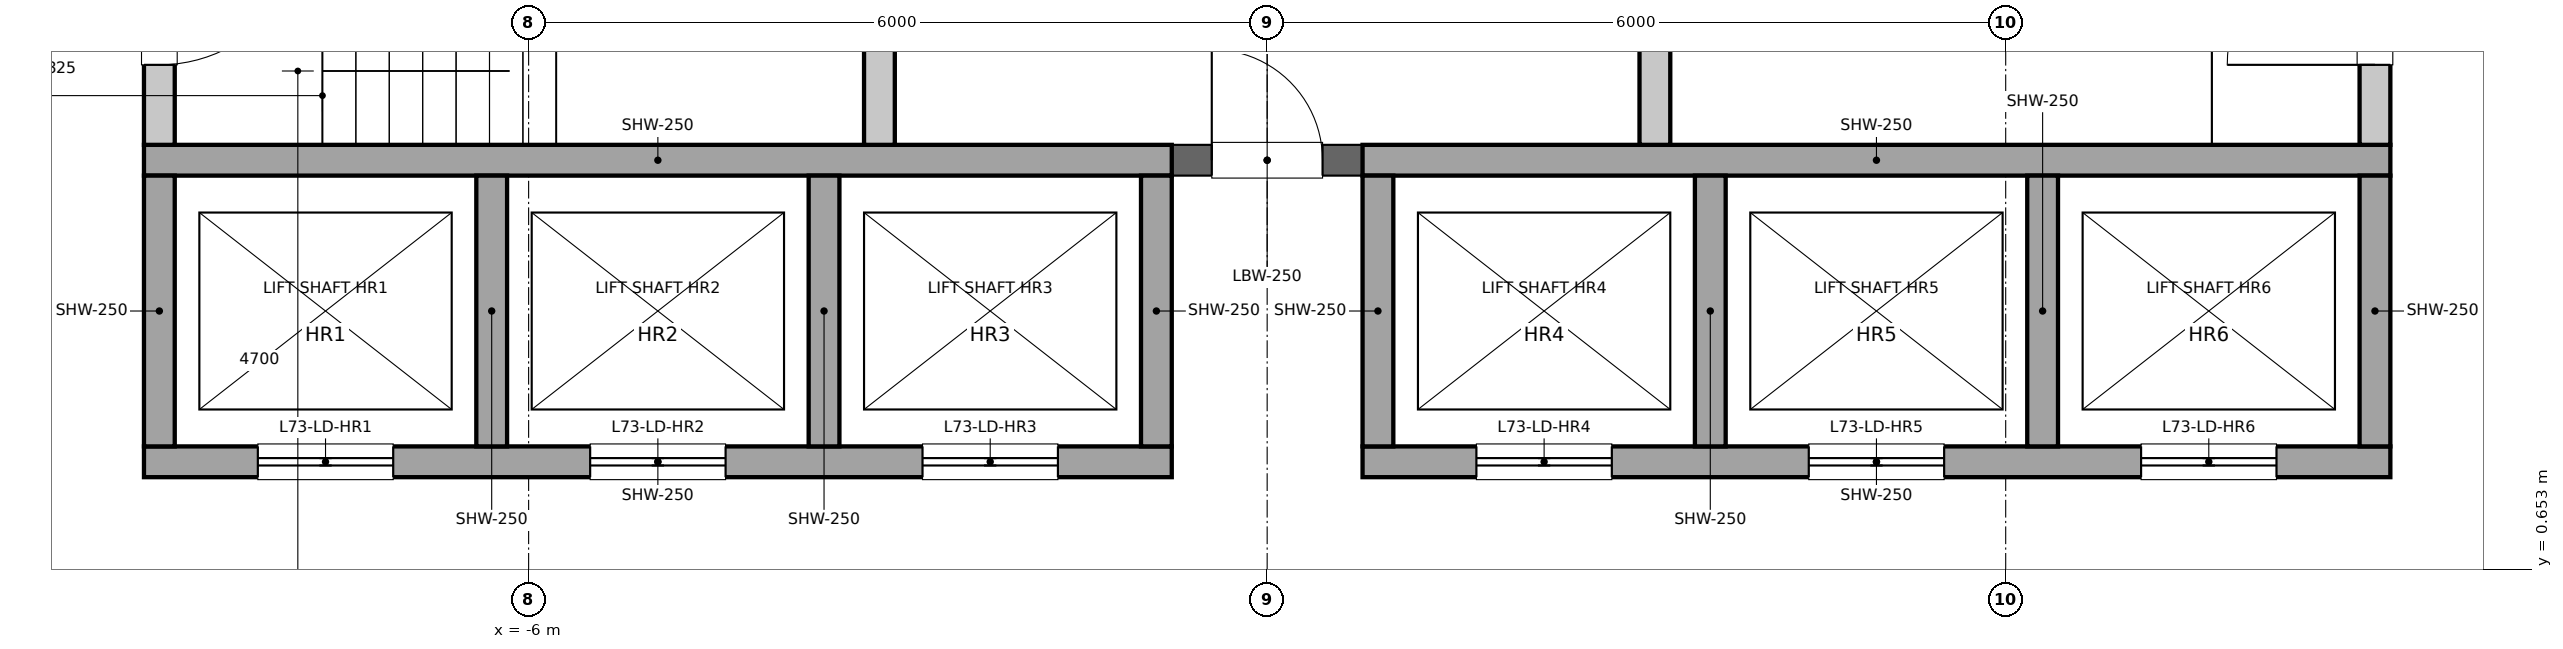
"""IFC4 building model, lengths in metres.
Left out: names, types, materials, properties, quantities, classifications, styles, units other than length and angle.
Written with IfcOpenShell. Run it as: python <this file> out.ifc"""

import sys

from ifc_helpers import new_model, si_unit, direction, frame, frame_2d, origin, place, context, subcontext, project, spatial, rectangle, extrude, element, fill, save


model = new_model("IFC4")
c1 = context("Model", 3, precision=1e-05, world=origin(), true_north=direction((0.0, 1.0)))
c2 = subcontext(c1, "Body", "Model", "MODEL_VIEW")
j1 = project(units=[si_unit("LENGTHUNIT", "METRE"), si_unit("PLANEANGLEUNIT", "RADIAN")], contexts=[c1])
p1 = place(None, origin())
s1 = spatial("IfcSite", under=j1, at=p1, CompositionType="ELEMENT")
p2 = place(p1, origin())
s2 = spatial("IfcBuilding", under=s1, at=p2, CompositionType="ELEMENT")
p3 = place(p2, frame((0.0, 0.0, 329.8)))
s3 = spatial("IfcBuildingStorey", under=s2, at=p3, CompositionType="ELEMENT", Elevation=329.8)
p4 = place(p3, frame((-9.0, 4.1, 0.0), z_axis=(0.0, 0.0, 1.0), x_axis=(0.0, 1.0, 0.0)))
e1 = element("IfcWall", 1, at=p4, inside=s3, PredefinedType="SOLIDWALL", context=c2, shape_type="SweptSolid", body=[
    extrude(rectangle(XDim=2.5, YDim=0.25, at=frame_2d((1.25, 0.0))), origin(), (0.0, 0.0, 1.0), 5.8),
])
p5 = place(p4, frame((0.65, 0.0, 0.0)))
e2 = element("IfcOpeningElement", 2, at=p5, cuts=e1, PredefinedType="OPENING", context=c2, shape_type="SweptSolid", body=[
    extrude(rectangle(XDim=1.2, YDim=2.1, at=frame_2d((0.6, 1.05))), frame((0.0, 0.125, 0.0), z_axis=(0.0, -1.0, 0.0), x_axis=(1.0, 0.0, 0.0)), (0.0, 0.0, 1.0), 0.25),
])
p6 = place(p3, frame((9.0, 4.1, 0.0), z_axis=(0.0, 0.0, 1.0), x_axis=(0.0, 1.0, 0.0)))
e3 = element("IfcWall", 3, at=p6, inside=s3, PredefinedType="SOLIDWALL", context=c2, shape_type="SweptSolid", body=[
    extrude(rectangle(XDim=2.5, YDim=0.25, at=frame_2d((1.25, 0.0))), origin(), (0.0, 0.0, 1.0), 5.8),
])
p7 = place(p6, frame((0.65, 0.0, 0.0)))
e4 = element("IfcOpeningElement", 4, at=p7, cuts=e3, PredefinedType="OPENING", context=c2, shape_type="SweptSolid", body=[
    extrude(rectangle(XDim=1.2, YDim=2.1, at=frame_2d((0.6, 1.05))), frame((0.0, 0.125, 0.0), z_axis=(0.0, -1.0, 0.0), x_axis=(1.0, 0.0, 0.0)), (0.0, 0.0, 1.0), 0.25),
])
for number, where, z_axis, x_axis in (
    (5, (-3.15, 4.1, 0.0), (0.0, 0.0, 1.0), (0.0, 1.0, 0.0)),
    (6, (3.15, 4.1, 0.0), (0.0, 0.0, 1.0), (0.0, 1.0, 0.0)),
):
    element("IfcWall", number, at=place(p3, frame(where, z_axis=z_axis, x_axis=x_axis)), inside=s3, PredefinedType="SOLIDWALL", context=c2, shape_type="SweptSolid", body=[
        extrude(rectangle(XDim=2.5, YDim=0.25, at=frame_2d((1.25, 0.0))), origin(), (0.0, 0.0, 1.0), 5.8),
    ])
p8 = place(p3, frame((-0.775, 3.975, 0.0), z_axis=(0.0, 0.0, 1.0), x_axis=(1.0, 0.0, 0.0)))
e7 = element("IfcWall", 7, at=p8, inside=s3, PredefinedType="PARTITIONING", context=c2, shape_type="SweptSolid", body=[
    extrude(rectangle(XDim=1.55, YDim=0.25, at=frame_2d((0.775, 0.0))), origin(), (0.0, 0.0, 1.0), 5.8),
])
p9 = place(p8, frame((0.325, 0.0, 0.0)))
e8 = element("IfcOpeningElement", 8, at=p9, cuts=e7, PredefinedType="OPENING", context=c2, shape_type="SweptSolid", body=[
    extrude(rectangle(XDim=0.9, YDim=2.1, at=frame_2d((0.45, 1.05))), frame((0.0, 0.125, 0.0), z_axis=(0.0, -1.0, 0.0), x_axis=(1.0, 0.0, 0.0)), (0.0, 0.0, 1.0), 0.25),
])
p10 = place(p3, frame((-9.125, 1.525, 0.0), z_axis=(0.0, 0.0, 1.0), x_axis=(1.0, 0.0, 0.0)))
e9 = element("IfcWall", 9, at=p10, inside=s3, PredefinedType="SOLIDWALL", context=c2, shape_type="SweptSolid", body=[
    extrude(rectangle(XDim=8.35, YDim=0.25, at=frame_2d((4.175, 0.0))), origin(), (0.0, 0.0, 1.0), 5.8),
])
p11 = place(p10, frame((0.925, 0.0, 0.0)))
e10 = element("IfcOpeningElement", 10, at=p11, cuts=e9, PredefinedType="OPENING", context=c2, shape_type="SweptSolid", body=[
    extrude(rectangle(XDim=1.1, YDim=2.1, at=frame_2d((0.55, 1.05))), frame((0.0, 0.125, 0.0), z_axis=(0.0, -1.0, 0.0), x_axis=(1.0, 0.0, 0.0)), (0.0, 0.0, 1.0), 0.25),
])
p12 = place(p10, frame((3.625, 0.0, 0.0)))
e11 = element("IfcOpeningElement", 11, at=p12, cuts=e9, PredefinedType="OPENING", context=c2, shape_type="SweptSolid", body=[
    extrude(rectangle(XDim=1.1, YDim=2.1, at=frame_2d((0.55, 1.05))), frame((0.0, 0.125, 0.0), z_axis=(0.0, -1.0, 0.0), x_axis=(1.0, 0.0, 0.0)), (0.0, 0.0, 1.0), 0.25),
])
p13 = place(p10, frame((6.325, 0.0, 0.0)))
e12 = element("IfcOpeningElement", 12, at=p13, cuts=e9, PredefinedType="OPENING", context=c2, shape_type="SweptSolid", body=[
    extrude(rectangle(XDim=1.1, YDim=2.1, at=frame_2d((0.55, 1.05))), frame((0.0, 0.125, 0.0), z_axis=(0.0, -1.0, 0.0), x_axis=(1.0, 0.0, 0.0)), (0.0, 0.0, 1.0), 0.25),
])
p14 = place(p3, frame((0.775, 1.525, 0.0), z_axis=(0.0, 0.0, 1.0), x_axis=(1.0, 0.0, 0.0)))
e13 = element("IfcWall", 13, at=p14, inside=s3, PredefinedType="SOLIDWALL", context=c2, shape_type="SweptSolid", body=[
    extrude(rectangle(XDim=8.35, YDim=0.25, at=frame_2d((4.175, 0.0))), origin(), (0.0, 0.0, 1.0), 5.8),
])
p15 = place(p14, frame((0.925, 0.0, 0.0)))
e14 = element("IfcOpeningElement", 14, at=p15, cuts=e13, PredefinedType="OPENING", context=c2, shape_type="SweptSolid", body=[
    extrude(rectangle(XDim=1.1, YDim=2.1, at=frame_2d((0.55, 1.05))), frame((0.0, 0.125, 0.0), z_axis=(0.0, -1.0, 0.0), x_axis=(1.0, 0.0, 0.0)), (0.0, 0.0, 1.0), 0.25),
])
p16 = place(p14, frame((3.625, 0.0, 0.0)))
e15 = element("IfcOpeningElement", 15, at=p16, cuts=e13, PredefinedType="OPENING", context=c2, shape_type="SweptSolid", body=[
    extrude(rectangle(XDim=1.1, YDim=2.1, at=frame_2d((0.55, 1.05))), frame((0.0, 0.125, 0.0), z_axis=(0.0, -1.0, 0.0), x_axis=(1.0, 0.0, 0.0)), (0.0, 0.0, 1.0), 0.25),
])
p17 = place(p14, frame((6.325, 0.0, 0.0)))
e16 = element("IfcOpeningElement", 16, at=p17, cuts=e13, PredefinedType="OPENING", context=c2, shape_type="SweptSolid", body=[
    extrude(rectangle(XDim=1.1, YDim=2.1, at=frame_2d((0.55, 1.05))), frame((0.0, 0.125, 0.0), z_axis=(0.0, -1.0, 0.0), x_axis=(1.0, 0.0, 0.0)), (0.0, 0.0, 1.0), 0.25),
])
for number, where, z_axis, x_axis in (
    (17, (-9.125, 3.975, 0.0), (0.0, 0.0, 1.0), (1.0, 0.0, 0.0)),
    (18, (0.775, 3.975, 0.0), (0.0, 0.0, 1.0), (1.0, 0.0, 0.0)),
):
    element("IfcWall", number, at=place(p3, frame(where, z_axis=z_axis, x_axis=x_axis)), inside=s3, PredefinedType="SOLIDWALL", context=c2, shape_type="SweptSolid", body=[
        extrude(rectangle(XDim=8.35, YDim=0.25, at=frame_2d((4.175, 0.0))), origin(), (0.0, 0.0, 1.0), 5.8),
    ])
for number, where, z_axis, x_axis in (
    (19, (-9.0, 1.65, 0.0), (0.0, 0.0, 1.0), (0.0, 1.0, 0.0)),
    (20, (9.0, 1.65, 0.0), (0.0, 0.0, 1.0), (0.0, 1.0, 0.0)),
    (21, (-6.3, 1.65, 0.0), (0.0, 0.0, 1.0), (0.0, 1.0, 0.0)),
    (22, (6.3, 1.65, 0.0), (0.0, 0.0, 1.0), (0.0, 1.0, 0.0)),
    (23, (-3.6, 1.65, 0.0), (0.0, 0.0, 1.0), (0.0, 1.0, 0.0)),
    (24, (3.6, 1.65, 0.0), (0.0, 0.0, 1.0), (0.0, 1.0, 0.0)),
    (25, (-0.9, 1.65, 0.0), (0.0, 0.0, 1.0), (0.0, 1.0, 0.0)),
    (26, (0.9, 1.65, 0.0), (0.0, 0.0, 1.0), (0.0, 1.0, 0.0)),
):
    element("IfcWall", number, at=place(p3, frame(where, z_axis=z_axis, x_axis=x_axis)), inside=s3, PredefinedType="SOLIDWALL", context=c2, shape_type="SweptSolid", body=[
        extrude(rectangle(XDim=2.2, YDim=0.25, at=frame_2d((1.1, 0.0))), origin(), (0.0, 0.0, 1.0), 5.8),
    ])
p18 = place(p11, origin())
e27 = element("IfcDoor", 27, at=p18, inside=s3, OperationType="DOUBLE_DOOR_SLIDING", PredefinedType="DOOR", context=c2, shape_type="SweptSolid", body=[
    extrude(rectangle(XDim=1.1, YDim=2.1, at=frame_2d((0.55, 1.05))), frame((0.0, 0.025, 0.0), z_axis=(0.0, -1.0, 0.0), x_axis=(1.0, 0.0, 0.0)), (0.0, 0.0, 1.0), 0.05),
])
fill(e10, e27)
p19 = place(p12, origin())
e28 = element("IfcDoor", 28, at=p19, inside=s3, OperationType="DOUBLE_DOOR_SLIDING", PredefinedType="DOOR", context=c2, shape_type="SweptSolid", body=[
    extrude(rectangle(XDim=1.1, YDim=2.1, at=frame_2d((0.55, 1.05))), frame((0.0, 0.025, 0.0), z_axis=(0.0, -1.0, 0.0), x_axis=(1.0, 0.0, 0.0)), (0.0, 0.0, 1.0), 0.05),
])
fill(e11, e28)
p20 = place(p13, origin())
e29 = element("IfcDoor", 29, at=p20, inside=s3, OperationType="DOUBLE_DOOR_SLIDING", PredefinedType="DOOR", context=c2, shape_type="SweptSolid", body=[
    extrude(rectangle(XDim=1.1, YDim=2.1, at=frame_2d((0.55, 1.05))), frame((0.0, 0.025, 0.0), z_axis=(0.0, -1.0, 0.0), x_axis=(1.0, 0.0, 0.0)), (0.0, 0.0, 1.0), 0.05),
])
fill(e12, e29)
p21 = place(p15, origin())
e30 = element("IfcDoor", 30, at=p21, inside=s3, OperationType="DOUBLE_DOOR_SLIDING", PredefinedType="DOOR", context=c2, shape_type="SweptSolid", body=[
    extrude(rectangle(XDim=1.1, YDim=2.1, at=frame_2d((0.55, 1.05))), frame((0.0, 0.025, 0.0), z_axis=(0.0, -1.0, 0.0), x_axis=(1.0, 0.0, 0.0)), (0.0, 0.0, 1.0), 0.05),
])
fill(e14, e30)
p22 = place(p16, origin())
e31 = element("IfcDoor", 31, at=p22, inside=s3, OperationType="DOUBLE_DOOR_SLIDING", PredefinedType="DOOR", context=c2, shape_type="SweptSolid", body=[
    extrude(rectangle(XDim=1.1, YDim=2.1, at=frame_2d((0.55, 1.05))), frame((0.0, 0.025, 0.0), z_axis=(0.0, -1.0, 0.0), x_axis=(1.0, 0.0, 0.0)), (0.0, 0.0, 1.0), 0.05),
])
fill(e15, e31)
p23 = place(p17, origin())
e32 = element("IfcDoor", 32, at=p23, inside=s3, OperationType="DOUBLE_DOOR_SLIDING", PredefinedType="DOOR", context=c2, shape_type="SweptSolid", body=[
    extrude(rectangle(XDim=1.1, YDim=2.1, at=frame_2d((0.55, 1.05))), frame((0.0, 0.025, 0.0), z_axis=(0.0, -1.0, 0.0), x_axis=(1.0, 0.0, 0.0)), (0.0, 0.0, 1.0), 0.05),
])
fill(e16, e32)
p24 = place(p5, origin())
e33 = element("IfcDoor", 33, at=p24, inside=s3, OperationType="SINGLE_SWING_RIGHT", PredefinedType="DOOR", context=c2, shape_type="SweptSolid", body=[
    extrude(rectangle(XDim=1.2, YDim=2.1, at=frame_2d((0.6, 1.05))), frame((0.0, 0.025, 0.0), z_axis=(0.0, -1.0, 0.0), x_axis=(1.0, 0.0, 0.0)), (0.0, 0.0, 1.0), 0.05),
])
fill(e2, e33)
p25 = place(p7, origin())
e34 = element("IfcDoor", 34, at=p25, inside=s3, OperationType="SINGLE_SWING_LEFT", PredefinedType="DOOR", context=c2, shape_type="SweptSolid", body=[
    extrude(rectangle(XDim=1.2, YDim=2.1, at=frame_2d((0.6, 1.05))), frame((0.0, 0.025, 0.0), z_axis=(0.0, -1.0, 0.0), x_axis=(1.0, 0.0, 0.0)), (0.0, 0.0, 1.0), 0.05),
])
fill(e4, e34)
p26 = place(p9, origin())
e35 = element("IfcDoor", 35, at=p26, inside=s3, OperationType="SINGLE_SWING_LEFT", PredefinedType="DOOR", context=c2, shape_type="SweptSolid", body=[
    extrude(rectangle(XDim=0.9, YDim=2.1, at=frame_2d((0.45, 1.05))), frame((0.0, 0.025, 0.0), z_axis=(0.0, -1.0, 0.0), x_axis=(1.0, 0.0, 0.0)), (0.0, 0.0, 1.0), 0.05),
])
fill(e8, e35)
save(model, sys.argv[1])
